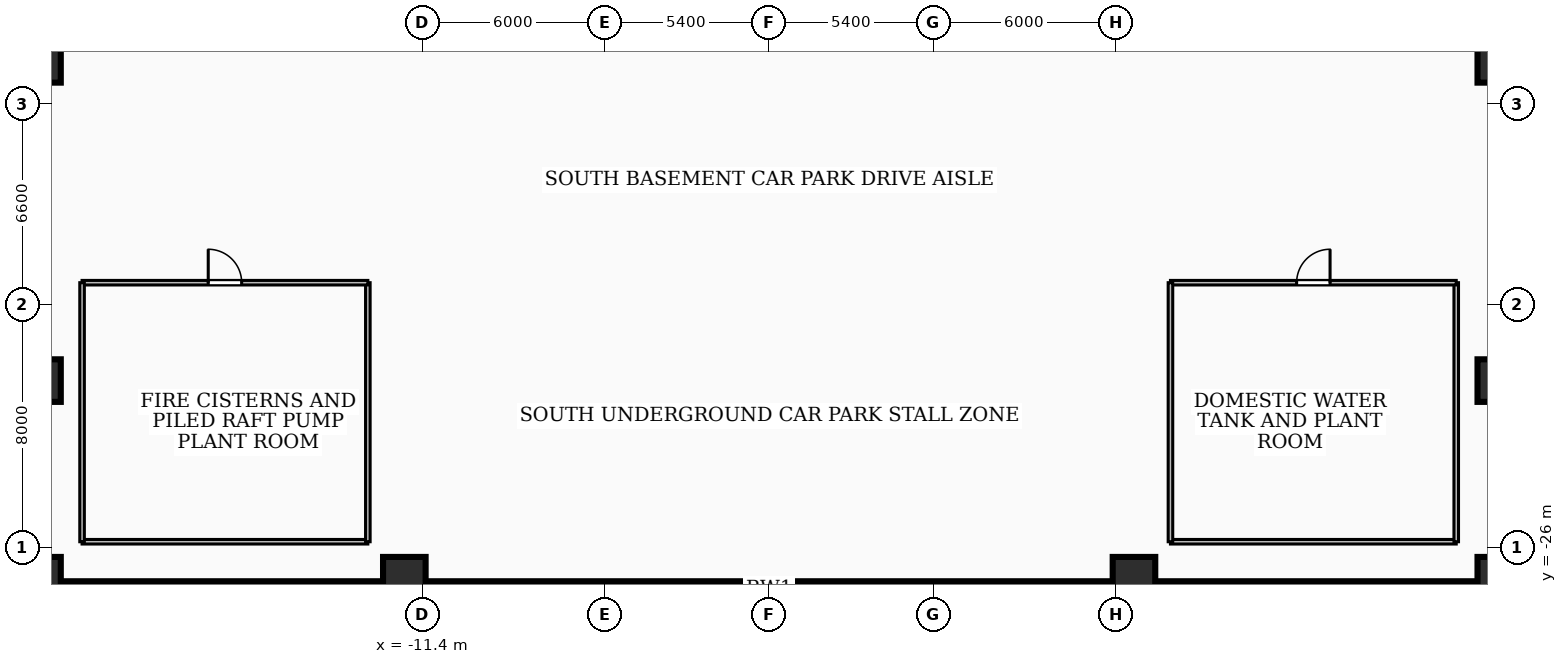
"""IFC4 building model, lengths in metres.
Left out: names, types, materials, properties, quantities, classifications, styles, units other than length and angle.
Written with IfcOpenShell. Run it as: python <this file> out.ifc"""

import sys

from ifc_helpers import new_model, si_unit, direction, frame, frame_2d, origin, origin_2d, place, context, subcontext, project, spatial, rectangle, extrude, element, fill, save


model = new_model("IFC4")
c1 = context("Model", 3, precision=1e-05, world=origin(), true_north=direction((0.0, 1.0)))
c2 = subcontext(c1, "Body", "Model", "MODEL_VIEW")
j1 = project(units=[si_unit("LENGTHUNIT", "METRE"), si_unit("PLANEANGLEUNIT", "RADIAN")], contexts=[c1])
p1 = place(None, origin())
s1 = spatial("IfcSite", under=j1, at=p1, CompositionType="ELEMENT")
p2 = place(p1, origin())
s2 = spatial("IfcBuilding", under=s1, at=p2, CompositionType="ELEMENT")
p3 = place(p2, frame((0.0, 0.0, -9.0)))
s3 = spatial("IfcBuildingStorey", under=s2, at=p3, CompositionType="ELEMENT", Elevation=-9.0)
p4 = place(p3, frame((35.75, -27.35, 0.0), z_axis=(0.0, 0.0, 1.0), x_axis=(-1.0, 0.0, 0.0)))
e1 = element("IfcWall", 1, at=p4, inside=s3, PredefinedType="USERDEFINED", context=c2, shape_type="SweptSolid", body=[
    extrude(rectangle(XDim=71.5, YDim=0.5, at=frame_2d((35.75, 0.0))), origin(), (0.0, 0.0, 1.0), 4.18),
])
p5 = place(p2, frame((0.0, 0.0, -4.5)))
s4 = spatial("IfcBuildingStorey", under=s2, at=p5, CompositionType="ELEMENT", Elevation=-4.5)
p6 = place(p5, frame((-19.8, -28.58, -4.85), z_axis=(0.0, 0.0, 1.0), x_axis=(0.0, 1.0, 0.0)))
e2 = element("IfcWall", 2, at=p6, inside=s4, PredefinedType="SOLIDWALL", context=c2, shape_type="SweptSolid", body=[
    extrude(rectangle(XDim=1.96, YDim=0.3, at=frame_2d((0.98, 0.0))), origin(), (0.0, 0.0, 1.0), 9.145),
])
p7 = place(p5, frame((-17.16, -28.58, -4.85), z_axis=(0.0, 0.0, 1.0), x_axis=(0.0, 1.0, 0.0)))
e3 = element("IfcWall", 3, at=p7, inside=s4, PredefinedType="SOLIDWALL", context=c2, shape_type="SweptSolid", body=[
    extrude(rectangle(XDim=1.96, YDim=0.3, at=frame_2d((0.98, 0.0))), origin(), (0.0, 0.0, 1.0), 9.35),
])
p8 = place(p5, frame((19.8, -28.58, -4.85), z_axis=(0.0, 0.0, 1.0), x_axis=(0.0, 1.0, 0.0)))
e4 = element("IfcWall", 4, at=p8, inside=s4, PredefinedType="SOLIDWALL", context=c2, shape_type="SweptSolid", body=[
    extrude(rectangle(XDim=1.96, YDim=0.3, at=frame_2d((0.98, 0.0))), origin(), (0.0, 0.0, 1.0), 9.145),
])
p9 = place(p5, frame((17.16, -28.58, -4.85), z_axis=(0.0, 0.0, 1.0), x_axis=(0.0, 1.0, 0.0)))
e5 = element("IfcWall", 5, at=p9, inside=s4, PredefinedType="SOLIDWALL", context=c2, shape_type="SweptSolid", body=[
    extrude(rectangle(XDim=1.96, YDim=0.3, at=frame_2d((0.98, 0.0))), origin(), (0.0, 0.0, 1.0), 9.35),
])
for number, where, z_axis, x_axis in (
    (6, (-24.0, -27.0, 0.0), (0.0, 0.0, 1.0), (1.0, 0.0, 0.0)),
    (7, (-12.0, -27.0, 0.0), (0.0, 0.0, 1.0), (1.0, 0.0, 0.0)),
    (8, (12.0, -27.0, 0.0), (0.0, 0.0, 1.0), (1.0, 0.0, 0.0)),
    (9, (24.0, -27.0, 0.0), (0.0, 0.0, 1.0), (1.0, 0.0, 0.0)),
    (10, (-24.0, -10.0, 0.0), (0.0, 0.0, 1.0), (1.0, 0.0, 0.0)),
    (11, (24.0, -10.0, 0.0), (0.0, 0.0, 1.0), (1.0, 0.0, 0.0)),
    (12, (-24.0, -20.5, 0.0), (0.0, 0.0, 1.0), (1.0, 0.0, 0.0)),
    (13, (24.0, -20.5, 0.0), (0.0, 0.0, 1.0), (1.0, 0.0, 0.0)),
):
    element("IfcColumn", number, at=place(p3, frame(where, z_axis=z_axis, x_axis=x_axis)), inside=s3, PredefinedType="COLUMN", context=c2, shape_type="SweptSolid", body=[
        extrude(rectangle(XDim=1.4, YDim=1.4, at=origin_2d()), origin(), (0.0, 0.0, 1.0), 4.5),
    ])
p10 = place(p3, frame((-22.6, -17.28, 0.0), z_axis=(0.0, 0.0, 1.0), x_axis=(1.0, 0.0, 0.0)))
e14 = element("IfcWall", 14, at=p10, inside=s3, PredefinedType="PARTITIONING", context=c2, shape_type="SweptSolid", body=[
    extrude(rectangle(XDim=9.4, YDim=0.15, at=frame_2d((4.7, 0.0))), origin(), (0.0, 0.0, 1.0), 4.18),
])
p11 = place(p10, frame((4.15, 0.0, 0.0)))
e15 = element("IfcOpeningElement", 15, at=p11, cuts=e14, PredefinedType="OPENING", context=c2, shape_type="SweptSolid", body=[
    extrude(rectangle(XDim=1.1, YDim=2.15, at=frame_2d((0.55, 1.075))), frame((0.0, 0.085, 0.0), z_axis=(0.0, -1.0, 0.0), x_axis=(1.0, 0.0, 0.0)), (0.0, 0.0, 1.0), 0.17),
])
for number, where, z_axis, x_axis in (
    (16, (-22.6, -25.8, 0.0), (0.0, 0.0, 1.0), (0.0, 1.0, 0.0)),
    (17, (-13.2, -25.8, 0.0), (0.0, 0.0, 1.0), (0.0, 1.0, 0.0)),
):
    element("IfcWall", number, at=place(p3, frame(where, z_axis=z_axis, x_axis=x_axis)), inside=s3, PredefinedType="PARTITIONING", context=c2, shape_type="SweptSolid", body=[
        extrude(rectangle(XDim=8.52, YDim=0.15, at=frame_2d((4.26, 0.0))), origin(), (0.0, 0.0, 1.0), 4.18),
    ])
p12 = place(p3, frame((-22.6, -25.8, 0.0), z_axis=(0.0, 0.0, 1.0), x_axis=(1.0, 0.0, 0.0)))
e18 = element("IfcWall", 18, at=p12, inside=s3, PredefinedType="PARTITIONING", context=c2, shape_type="SweptSolid", body=[
    extrude(rectangle(XDim=9.4, YDim=0.15, at=frame_2d((4.7, 0.0))), origin(), (0.0, 0.0, 1.0), 4.18),
])
p13 = place(p3, frame((13.2, -17.28, 0.0), z_axis=(0.0, 0.0, 1.0), x_axis=(1.0, 0.0, 0.0)))
e19 = element("IfcWall", 19, at=p13, inside=s3, PredefinedType="PARTITIONING", context=c2, shape_type="SweptSolid", body=[
    extrude(rectangle(XDim=9.4, YDim=0.15, at=frame_2d((4.7, 0.0))), origin(), (0.0, 0.0, 1.0), 4.18),
])
p14 = place(p13, frame((4.15, 0.0, 0.0)))
e20 = element("IfcOpeningElement", 20, at=p14, cuts=e19, PredefinedType="OPENING", context=c2, shape_type="SweptSolid", body=[
    extrude(rectangle(XDim=1.1, YDim=2.15, at=frame_2d((0.55, 1.075))), frame((0.0, 0.085, 0.0), z_axis=(0.0, -1.0, 0.0), x_axis=(1.0, 0.0, 0.0)), (0.0, 0.0, 1.0), 0.17),
])
for number, where, z_axis, x_axis in (
    (21, (13.2, -25.8, 0.0), (0.0, 0.0, 1.0), (0.0, 1.0, 0.0)),
    (22, (22.6, -25.8, 0.0), (0.0, 0.0, 1.0), (0.0, 1.0, 0.0)),
):
    element("IfcWall", number, at=place(p3, frame(where, z_axis=z_axis, x_axis=x_axis)), inside=s3, PredefinedType="PARTITIONING", context=c2, shape_type="SweptSolid", body=[
        extrude(rectangle(XDim=8.52, YDim=0.15, at=frame_2d((4.26, 0.0))), origin(), (0.0, 0.0, 1.0), 4.18),
    ])
p15 = place(p3, frame((13.2, -25.8, 0.0), z_axis=(0.0, 0.0, 1.0), x_axis=(1.0, 0.0, 0.0)))
e23 = element("IfcWall", 23, at=p15, inside=s3, PredefinedType="PARTITIONING", context=c2, shape_type="SweptSolid", body=[
    extrude(rectangle(XDim=9.4, YDim=0.15, at=frame_2d((4.7, 0.0))), origin(), (0.0, 0.0, 1.0), 4.18),
])
p16 = place(p11, origin())
e24 = element("IfcDoor", 24, at=p16, inside=s3, OperationType="SINGLE_SWING_LEFT", PredefinedType="DOOR", context=c2, shape_type="SweptSolid", body=[
    extrude(rectangle(XDim=1.1, YDim=2.15, at=frame_2d((0.55, 1.075))), frame((0.0, 0.025, 0.0), z_axis=(0.0, -1.0, 0.0), x_axis=(1.0, 0.0, 0.0)), (0.0, 0.0, 1.0), 0.05),
])
fill(e15, e24)
p17 = place(p14, origin())
e25 = element("IfcDoor", 25, at=p17, inside=s3, OperationType="SINGLE_SWING_RIGHT", PredefinedType="DOOR", context=c2, shape_type="SweptSolid", body=[
    extrude(rectangle(XDim=1.1, YDim=2.15, at=frame_2d((0.55, 1.075))), frame((0.0, 0.025, 0.0), z_axis=(0.0, -1.0, 0.0), x_axis=(1.0, 0.0, 0.0)), (0.0, 0.0, 1.0), 0.05),
])
fill(e20, e25)
save(model, sys.argv[1])
